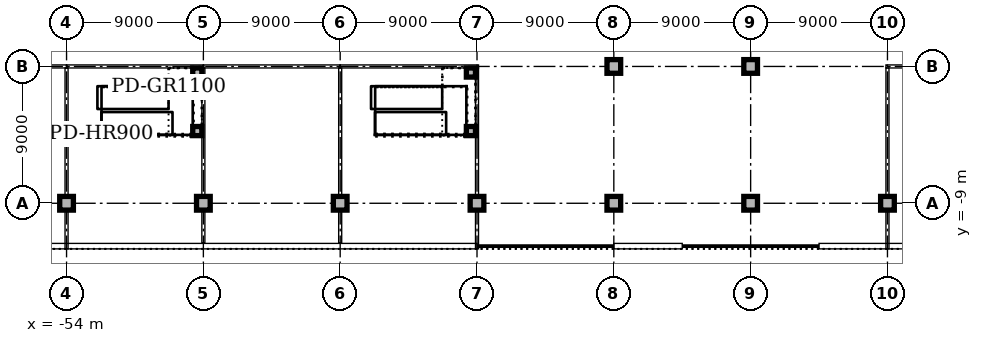
"""IFC4 building model, lengths in metres.
Left out: names, types, materials, properties, quantities, classifications, styles, units other than length and angle.
Written with IfcOpenShell. Run it as: python <this file> out.ifc"""

import sys

from ifc_helpers import new_model, si_unit, direction, frame, frame_2d, origin, origin_2d, place, context, subcontext, project, spatial, rectangle, extrude, element, fill, save


model = new_model("IFC4")
c1 = context("Model", 3, precision=1e-05, world=origin(), true_north=direction((0.0, 1.0)))
c2 = subcontext(c1, "Body", "Model", "MODEL_VIEW")
j1 = project(units=[si_unit("LENGTHUNIT", "METRE"), si_unit("PLANEANGLEUNIT", "RADIAN")], contexts=[c1])
p1 = place(None, origin())
s1 = spatial("IfcSite", under=j1, at=p1, CompositionType="ELEMENT")
p2 = place(p1, origin())
s2 = spatial("IfcBuilding", under=s1, at=p2, CompositionType="ELEMENT")
p3 = place(p2, origin())
s3 = spatial("IfcBuildingStorey", under=s2, at=p3, CompositionType="ELEMENT", Elevation=0.0)
for number, where, z_axis, x_axis in (
    (1, (-54.0, -9.0, 0.0), (0.0, 0.0, 1.0), (1.0, 0.0, 0.0)),
    (2, (-45.0, -9.0, 0.0), (0.0, 0.0, 1.0), (1.0, 0.0, 0.0)),
    (3, (-36.0, -9.0, 0.0), (0.0, 0.0, 1.0), (1.0, 0.0, 0.0)),
    (4, (-27.0, -9.0, 0.0), (0.0, 0.0, 1.0), (1.0, 0.0, 0.0)),
    (5, (-18.0, -9.0, 0.0), (0.0, 0.0, 1.0), (1.0, 0.0, 0.0)),
    (6, (-18.0, 0.0, 0.0), (0.0, 0.0, 1.0), (1.0, 0.0, 0.0)),
    (7, (-9.0, -9.0, 0.0), (0.0, 0.0, 1.0), (1.0, 0.0, 0.0)),
    (8, (-9.0, 0.0, 0.0), (0.0, 0.0, 1.0), (1.0, 0.0, 0.0)),
    (9, (0.0, -9.0, 0.0), (0.0, 0.0, 1.0), (1.0, 0.0, 0.0)),
):
    element("IfcColumn", number, at=place(p3, frame(where, z_axis=z_axis, x_axis=x_axis)), inside=s3, PredefinedType="COLUMN", context=c2, shape_type="SweptSolid", body=[
        extrude(rectangle(XDim=0.9, YDim=0.9, at=origin_2d()), origin(), (0.0, 0.0, 1.0), 5.7),
    ])
p4 = place(p3, frame((-81.0, -11.82, 0.0), z_axis=(0.0, 0.0, 1.0), x_axis=(1.0, 0.0, 0.0)))
e10 = element("IfcWall", 10, at=p4, inside=s3, PredefinedType="STANDARD", context=c2, shape_type="SweptSolid", body=[
    extrude(rectangle(XDim=54.0, YDim=0.36, at=frame_2d((27.0, 0.0))), origin(), (0.0, 0.0, 1.0), 5.7),
])
p5 = place(p4, frame((22.8, 0.0, 0.0)))
e11 = element("IfcOpeningElement", 11, at=p5, cuts=e10, PredefinedType="OPENING", context=c2, shape_type="SweptSolid", body=[
    extrude(rectangle(XDim=2.4, YDim=2.4, at=frame_2d((1.2, 1.2))), frame((0.0, 0.19, 0.0), z_axis=(0.0, -1.0, 0.0), x_axis=(1.0, 0.0, 0.0)), (0.0, 0.0, 1.0), 0.38),
])
p6 = place(p4, frame((13.8, 0.0, 0.0)))
e12 = element("IfcOpeningElement", 12, at=p6, cuts=e10, PredefinedType="OPENING", context=c2, shape_type="SweptSolid", body=[
    extrude(rectangle(XDim=2.4, YDim=2.2, at=frame_2d((1.2, 1.1))), frame((0.0, 0.19, 0.0), z_axis=(0.0, -1.0, 0.0), x_axis=(1.0, 0.0, 0.0)), (0.0, 0.0, 1.0), 0.38),
])
p7 = place(p4, frame((39.3, 0.0, 0.0)))
e13 = element("IfcOpeningElement", 13, at=p7, cuts=e10, PredefinedType="OPENING", context=c2, shape_type="SweptSolid", body=[
    extrude(rectangle(XDim=2.4, YDim=2.2, at=frame_2d((1.2, 1.1))), frame((0.0, 0.19, 0.0), z_axis=(0.0, -1.0, 0.0), x_axis=(1.0, 0.0, 0.0)), (0.0, 0.0, 1.0), 0.38),
])
p8 = place(p4, frame((2.1, 0.0, 0.0)))
e14 = element("IfcOpeningElement", 14, at=p8, cuts=e10, PredefinedType="OPENING", context=c2, shape_type="SweptSolid", body=[
    extrude(rectangle(XDim=1.8, YDim=2.2, at=frame_2d((0.9, 1.1))), frame((0.0, 0.19, 0.0), z_axis=(0.0, -1.0, 0.0), x_axis=(1.0, 0.0, 0.0)), (0.0, 0.0, 1.0), 0.38),
])
p9 = place(p4, frame((30.6, 0.0, 0.0)))
e15 = element("IfcOpeningElement", 15, at=p9, cuts=e10, PredefinedType="OPENING", context=c2, shape_type="SweptSolid", body=[
    extrude(rectangle(XDim=1.8, YDim=2.2, at=frame_2d((0.9, 1.1))), frame((0.0, 0.19, 0.0), z_axis=(0.0, -1.0, 0.0), x_axis=(1.0, 0.0, 0.0)), (0.0, 0.0, 1.0), 0.38),
])
p10 = place(p4, frame((48.6, 0.0, 0.0)))
e16 = element("IfcOpeningElement", 16, at=p10, cuts=e10, PredefinedType="OPENING", context=c2, shape_type="SweptSolid", body=[
    extrude(rectangle(XDim=1.8, YDim=2.2, at=frame_2d((0.9, 1.1))), frame((0.0, 0.19, 0.0), z_axis=(0.0, -1.0, 0.0), x_axis=(1.0, 0.0, 0.0)), (0.0, 0.0, 1.0), 0.38),
])
p11 = place(p4, frame((7.35, 0.0, 0.6)))
e17 = element("IfcOpeningElement", 17, at=p11, cuts=e10, PredefinedType="OPENING", context=c2, shape_type="SweptSolid", body=[
    extrude(rectangle(XDim=3.3, YDim=3.0, at=frame_2d((1.65, 1.5))), frame((0.0, 0.19, 0.0), z_axis=(0.0, -1.0, 0.0), x_axis=(1.0, 0.0, 0.0)), (0.0, 0.0, 1.0), 0.38),
])
p12 = place(p4, frame((34.35, 0.0, 0.6)))
e18 = element("IfcOpeningElement", 18, at=p12, cuts=e10, PredefinedType="OPENING", context=c2, shape_type="SweptSolid", body=[
    extrude(rectangle(XDim=3.3, YDim=3.0, at=frame_2d((1.65, 1.5))), frame((0.0, 0.19, 0.0), z_axis=(0.0, -1.0, 0.0), x_axis=(1.0, 0.0, 0.0)), (0.0, 0.0, 1.0), 0.38),
])
p13 = place(p4, frame((43.35, 0.0, 0.6)))
e19 = element("IfcOpeningElement", 19, at=p13, cuts=e10, PredefinedType="OPENING", context=c2, shape_type="SweptSolid", body=[
    extrude(rectangle(XDim=3.3, YDim=3.0, at=frame_2d((1.65, 1.5))), frame((0.0, 0.19, 0.0), z_axis=(0.0, -1.0, 0.0), x_axis=(1.0, 0.0, 0.0)), (0.0, 0.0, 1.0), 0.38),
])
p14 = place(p3, frame((-18.0, -11.82, 0.0), z_axis=(0.0, 0.0, 1.0), x_axis=(1.0, 0.0, 0.0)))
e20 = element("IfcWall", 20, at=p14, inside=s3, PredefinedType="STANDARD", context=c2, shape_type="SweptSolid", body=[
    extrude(rectangle(XDim=4.5, YDim=0.36, at=frame_2d((2.25, 0.0))), origin(), (0.0, 0.0, 1.0), 5.7),
])
p15 = place(p3, frame((-4.5, -11.82, 0.0), z_axis=(0.0, 0.0, 1.0), x_axis=(1.0, 0.0, 0.0)))
e21 = element("IfcWall", 21, at=p15, inside=s3, PredefinedType="STANDARD", context=c2, shape_type="SweptSolid", body=[
    extrude(rectangle(XDim=67.5, YDim=0.36, at=frame_2d((33.75, 0.0))), origin(), (0.0, 0.0, 1.0), 5.7),
])
p16 = place(p15, frame((1.05, 0.0, 0.0)))
e22 = element("IfcOpeningElement", 22, at=p16, cuts=e21, PredefinedType="OPENING", context=c2, shape_type="SweptSolid", body=[
    extrude(rectangle(XDim=2.4, YDim=2.4, at=frame_2d((1.2, 1.2))), frame((0.0, 0.19, 0.0), z_axis=(0.0, -1.0, 0.0), x_axis=(1.0, 0.0, 0.0)), (0.0, 0.0, 1.0), 0.38),
])
p17 = place(p15, frame((48.3, 0.0, 0.0)))
e23 = element("IfcOpeningElement", 23, at=p17, cuts=e21, PredefinedType="OPENING", context=c2, shape_type="SweptSolid", body=[
    extrude(rectangle(XDim=2.4, YDim=2.4, at=frame_2d((1.2, 1.2))), frame((0.0, 0.19, 0.0), z_axis=(0.0, -1.0, 0.0), x_axis=(1.0, 0.0, 0.0)), (0.0, 0.0, 1.0), 0.38),
])
p18 = place(p15, frame((34.8, 0.0, 0.0)))
e24 = element("IfcOpeningElement", 24, at=p18, cuts=e21, PredefinedType="OPENING", context=c2, shape_type="SweptSolid", body=[
    extrude(rectangle(XDim=2.4, YDim=2.4, at=frame_2d((1.2, 1.2))), frame((0.0, 0.19, 0.0), z_axis=(0.0, -1.0, 0.0), x_axis=(1.0, 0.0, 0.0)), (0.0, 0.0, 1.0), 0.38),
])
p19 = place(p15, frame((7.8, 0.0, 0.0)))
e25 = element("IfcOpeningElement", 25, at=p19, cuts=e21, PredefinedType="OPENING", context=c2, shape_type="SweptSolid", body=[
    extrude(rectangle(XDim=2.4, YDim=2.4, at=frame_2d((1.2, 1.2))), frame((0.0, 0.19, 0.0), z_axis=(0.0, -1.0, 0.0), x_axis=(1.0, 0.0, 0.0)), (0.0, 0.0, 1.0), 0.38),
])
p20 = place(p15, frame((17.1, 0.0, 0.0)))
e26 = element("IfcOpeningElement", 26, at=p20, cuts=e21, PredefinedType="OPENING", context=c2, shape_type="SweptSolid", body=[
    extrude(rectangle(XDim=1.8, YDim=2.2, at=frame_2d((0.9, 1.1))), frame((0.0, 0.19, 0.0), z_axis=(0.0, -1.0, 0.0), x_axis=(1.0, 0.0, 0.0)), (0.0, 0.0, 1.0), 0.38),
])
p21 = place(p15, frame((63.6, 0.0, 0.0)))
e27 = element("IfcOpeningElement", 27, at=p21, cuts=e21, PredefinedType="OPENING", context=c2, shape_type="SweptSolid", body=[
    extrude(rectangle(XDim=1.8, YDim=2.2, at=frame_2d((0.9, 1.1))), frame((0.0, 0.19, 0.0), z_axis=(0.0, -1.0, 0.0), x_axis=(1.0, 0.0, 0.0)), (0.0, 0.0, 1.0), 0.38),
])
p22 = place(p15, frame((11.85, 0.0, 0.6)))
e28 = element("IfcOpeningElement", 28, at=p22, cuts=e21, PredefinedType="OPENING", context=c2, shape_type="SweptSolid", body=[
    extrude(rectangle(XDim=3.3, YDim=3.0, at=frame_2d((1.65, 1.5))), frame((0.0, 0.19, 0.0), z_axis=(0.0, -1.0, 0.0), x_axis=(1.0, 0.0, 0.0)), (0.0, 0.0, 1.0), 0.38),
])
p23 = place(p15, frame((20.85, 0.0, 0.6)))
e29 = element("IfcOpeningElement", 29, at=p23, cuts=e21, PredefinedType="OPENING", context=c2, shape_type="SweptSolid", body=[
    extrude(rectangle(XDim=3.3, YDim=3.0, at=frame_2d((1.65, 1.5))), frame((0.0, 0.19, 0.0), z_axis=(0.0, -1.0, 0.0), x_axis=(1.0, 0.0, 0.0)), (0.0, 0.0, 1.0), 0.38),
])
p24 = place(p15, frame((25.35, 0.0, 0.6)))
e30 = element("IfcOpeningElement", 30, at=p24, cuts=e21, PredefinedType="OPENING", context=c2, shape_type="SweptSolid", body=[
    extrude(rectangle(XDim=3.3, YDim=3.0, at=frame_2d((1.65, 1.5))), frame((0.0, 0.19, 0.0), z_axis=(0.0, -1.0, 0.0), x_axis=(1.0, 0.0, 0.0)), (0.0, 0.0, 1.0), 0.38),
])
p25 = place(p15, frame((29.85, 0.0, 0.6)))
e31 = element("IfcOpeningElement", 31, at=p25, cuts=e21, PredefinedType="OPENING", context=c2, shape_type="SweptSolid", body=[
    extrude(rectangle(XDim=3.3, YDim=3.0, at=frame_2d((1.65, 1.5))), frame((0.0, 0.19, 0.0), z_axis=(0.0, -1.0, 0.0), x_axis=(1.0, 0.0, 0.0)), (0.0, 0.0, 1.0), 0.38),
])
p26 = place(p15, frame((38.85, 0.0, 0.6)))
e32 = element("IfcOpeningElement", 32, at=p26, cuts=e21, PredefinedType="OPENING", context=c2, shape_type="SweptSolid", body=[
    extrude(rectangle(XDim=3.3, YDim=3.0, at=frame_2d((1.65, 1.5))), frame((0.0, 0.19, 0.0), z_axis=(0.0, -1.0, 0.0), x_axis=(1.0, 0.0, 0.0)), (0.0, 0.0, 1.0), 0.38),
])
p27 = place(p15, frame((43.35, 0.0, 0.6)))
e33 = element("IfcOpeningElement", 33, at=p27, cuts=e21, PredefinedType="OPENING", context=c2, shape_type="SweptSolid", body=[
    extrude(rectangle(XDim=3.3, YDim=3.0, at=frame_2d((1.65, 1.5))), frame((0.0, 0.19, 0.0), z_axis=(0.0, -1.0, 0.0), x_axis=(1.0, 0.0, 0.0)), (0.0, 0.0, 1.0), 0.38),
])
p28 = place(p15, frame((52.35, 0.0, 0.6)))
e34 = element("IfcOpeningElement", 34, at=p28, cuts=e21, PredefinedType="OPENING", context=c2, shape_type="SweptSolid", body=[
    extrude(rectangle(XDim=3.3, YDim=3.0, at=frame_2d((1.65, 1.5))), frame((0.0, 0.19, 0.0), z_axis=(0.0, -1.0, 0.0), x_axis=(1.0, 0.0, 0.0)), (0.0, 0.0, 1.0), 0.38),
])
p29 = place(p15, frame((56.85, 0.0, 0.6)))
e35 = element("IfcOpeningElement", 35, at=p29, cuts=e21, PredefinedType="OPENING", context=c2, shape_type="SweptSolid", body=[
    extrude(rectangle(XDim=3.3, YDim=3.0, at=frame_2d((1.65, 1.5))), frame((0.0, 0.19, 0.0), z_axis=(0.0, -1.0, 0.0), x_axis=(1.0, 0.0, 0.0)), (0.0, 0.0, 1.0), 0.38),
])
for number, where, z_axis, x_axis in (
    (36, (-45.4, -4.25, 0.0), (0.0, 0.0, 1.0), (1.0, 0.0, 0.0)),
    (37, (-45.4, -0.4, 0.0), (0.0, 0.0, 1.0), (1.0, 0.0, 0.0)),
    (38, (-27.4, -4.25, 0.0), (0.0, 0.0, 1.0), (1.0, 0.0, 0.0)),
    (39, (-27.4, -0.4, 0.0), (0.0, 0.0, 1.0), (1.0, 0.0, 0.0)),
):
    element("IfcColumn", number, at=place(p3, frame(where, z_axis=z_axis, x_axis=x_axis)), inside=s3, PredefinedType="COLUMN", context=c2, shape_type="SweptSolid", body=[
        extrude(rectangle(XDim=0.6, YDim=0.6, at=origin_2d()), origin(), (0.0, 0.0, 1.0), 6.0),
    ])
p30 = place(p3, frame((-54.0, 0.0, 0.0), z_axis=(0.0, 0.0, 1.0), x_axis=(1.0, 0.0, 0.0)))
e40 = element("IfcWall", 40, at=p30, inside=s3, PredefinedType="SOLIDWALL", context=c2, shape_type="SweptSolid", body=[
    extrude(rectangle(XDim=9.0, YDim=0.2, at=frame_2d((4.5, 0.0))), origin(), (0.0, 0.0, 1.0), 5.7),
])
p31 = place(p3, frame((-54.0, -12.0, 0.0), z_axis=(0.0, 0.0, 1.0), x_axis=(0.0, 1.0, 0.0)))
e41 = element("IfcWall", 41, at=p31, inside=s3, PredefinedType="SOLIDWALL", context=c2, shape_type="SweptSolid", body=[
    extrude(rectangle(XDim=2.53, YDim=0.2, at=frame_2d((1.265, 0.0))), origin(), (0.0, 0.0, 1.0), 5.7),
])
p32 = place(p3, frame((-54.0, -8.53, 0.0), z_axis=(0.0, 0.0, 1.0), x_axis=(0.0, 1.0, 0.0)))
e42 = element("IfcWall", 42, at=p32, inside=s3, PredefinedType="SOLIDWALL", context=c2, shape_type="SweptSolid", body=[
    extrude(rectangle(XDim=8.43, YDim=0.2, at=frame_2d((4.215, 0.0))), origin(), (0.0, 0.0, 1.0), 5.7),
])
p33 = place(p3, frame((-45.0, -11.6, 0.0), z_axis=(0.0, 0.0, 1.0), x_axis=(0.0, 1.0, 0.0)))
e43 = element("IfcWall", 43, at=p33, inside=s3, PredefinedType="SOLIDWALL", context=c2, shape_type="SweptSolid", body=[
    extrude(rectangle(XDim=2.13, YDim=0.2, at=frame_2d((1.065, 0.0))), origin(), (0.0, 0.0, 1.0), 5.7),
])
p34 = place(p3, frame((-45.0, -8.53, 0.0), z_axis=(0.0, 0.0, 1.0), x_axis=(0.0, 1.0, 0.0)))
e44 = element("IfcWall", 44, at=p34, inside=s3, PredefinedType="SOLIDWALL", context=c2, shape_type="SweptSolid", body=[
    extrude(rectangle(XDim=8.43, YDim=0.2, at=frame_2d((4.215, 0.0))), origin(), (0.0, 0.0, 1.0), 5.7),
])
p35 = place(p3, frame((-27.0, -12.0, 0.0), z_axis=(0.0, 0.0, 1.0), x_axis=(0.0, 1.0, 0.0)))
e45 = element("IfcWall", 45, at=p35, inside=s3, PredefinedType="SOLIDWALL", context=c2, shape_type="SweptSolid", body=[
    extrude(rectangle(XDim=2.53, YDim=0.2, at=frame_2d((1.265, 0.0))), origin(), (0.0, 0.0, 1.0), 5.7),
])
p36 = place(p3, frame((-27.0, -8.53, 0.0), z_axis=(0.0, 0.0, 1.0), x_axis=(0.0, 1.0, 0.0)))
e46 = element("IfcWall", 46, at=p36, inside=s3, PredefinedType="SOLIDWALL", context=c2, shape_type="SweptSolid", body=[
    extrude(rectangle(XDim=8.43, YDim=0.2, at=frame_2d((4.215, 0.0))), origin(), (0.0, 0.0, 1.0), 5.7),
])
p37 = place(p3, frame((-36.0, 0.0, 0.0), z_axis=(0.0, 0.0, 1.0), x_axis=(1.0, 0.0, 0.0)))
e47 = element("IfcWall", 47, at=p37, inside=s3, PredefinedType="SOLIDWALL", context=c2, shape_type="SweptSolid", body=[
    extrude(rectangle(XDim=9.1, YDim=0.2, at=frame_2d((4.55, 0.0))), origin(), (0.0, 0.0, 1.0), 5.7),
])
p38 = place(p3, frame((-36.0, -11.6, 0.0), z_axis=(0.0, 0.0, 1.0), x_axis=(0.0, 1.0, 0.0)))
e48 = element("IfcWall", 48, at=p38, inside=s3, PredefinedType="SOLIDWALL", context=c2, shape_type="SweptSolid", body=[
    extrude(rectangle(XDim=2.13, YDim=0.2, at=frame_2d((1.065, 0.0))), origin(), (0.0, 0.0, 1.0), 5.7),
])
p39 = place(p3, frame((-36.0, -8.53, 0.0), z_axis=(0.0, 0.0, 1.0), x_axis=(0.0, 1.0, 0.0)))
e49 = element("IfcWall", 49, at=p39, inside=s3, PredefinedType="SOLIDWALL", context=c2, shape_type="SweptSolid", body=[
    extrude(rectangle(XDim=8.43, YDim=0.2, at=frame_2d((4.215, 0.0))), origin(), (0.0, 0.0, 1.0), 5.7),
])
p40 = place(p3, frame((0.0, -12.0, 0.0), z_axis=(0.0, 0.0, 1.0), x_axis=(0.0, 1.0, 0.0)))
e50 = element("IfcWall", 50, at=p40, inside=s3, PredefinedType="PARTITIONING", context=c2, shape_type="SweptSolid", body=[
    extrude(rectangle(XDim=2.53, YDim=0.2, at=frame_2d((1.265, 0.0))), origin(), (0.0, 0.0, 1.0), 5.7),
])
p41 = place(p3, frame((0.0, -8.53, 0.0), z_axis=(0.0, 0.0, 1.0), x_axis=(0.0, 1.0, 0.0)))
e51 = element("IfcWall", 51, at=p41, inside=s3, PredefinedType="PARTITIONING", context=c2, shape_type="SweptSolid", body=[
    extrude(rectangle(XDim=8.43, YDim=0.2, at=frame_2d((4.215, 0.0))), origin(), (0.0, 0.0, 1.0), 5.7),
])
p42 = place(p41, frame((2.03, 0.0, 0.0)))
e52 = element("IfcOpeningElement", 52, at=p42, cuts=e51, PredefinedType="OPENING", context=c2, shape_type="SweptSolid", body=[
    extrude(rectangle(XDim=1.0, YDim=2.1, at=frame_2d((0.5, 1.05))), frame((0.0, 0.11, 0.0), z_axis=(0.0, -1.0, 0.0), x_axis=(1.0, 0.0, 0.0)), (0.0, 0.0, 1.0), 0.22),
])
p43 = place(p3, frame((-63.0, 0.0, 0.0), z_axis=(0.0, 0.0, 1.0), x_axis=(1.0, 0.0, 0.0)))
e53 = element("IfcWall", 53, at=p43, inside=s3, PredefinedType="PARTITIONING", context=c2, shape_type="SweptSolid", body=[
    extrude(rectangle(XDim=9.0, YDim=0.2, at=frame_2d((4.5, 0.0))), origin(), (0.0, 0.0, 1.0), 5.7),
])
p44 = place(p43, frame((7.7, 0.0, 0.0)))
e54 = element("IfcOpeningElement", 54, at=p44, cuts=e53, PredefinedType="OPENING", context=c2, shape_type="SweptSolid", body=[
    extrude(rectangle(XDim=1.0, YDim=2.1, at=frame_2d((0.5, 1.05))), frame((0.0, 0.11, 0.0), z_axis=(0.0, -1.0, 0.0), x_axis=(1.0, 0.0, 0.0)), (0.0, 0.0, 1.0), 0.22),
])
p45 = place(p3, frame((-45.0, 0.0, 0.0), z_axis=(0.0, 0.0, 1.0), x_axis=(1.0, 0.0, 0.0)))
e55 = element("IfcWall", 55, at=p45, inside=s3, PredefinedType="PARTITIONING", context=c2, shape_type="SweptSolid", body=[
    extrude(rectangle(XDim=9.0, YDim=0.2, at=frame_2d((4.5, 0.0))), origin(), (0.0, 0.0, 1.0), 5.7),
])
p46 = place(p45, frame((4.0, 0.0, 0.0)))
e56 = element("IfcOpeningElement", 56, at=p46, cuts=e55, PredefinedType="OPENING", context=c2, shape_type="SweptSolid", body=[
    extrude(rectangle(XDim=1.0, YDim=2.1, at=frame_2d((0.5, 1.05))), frame((0.0, 0.11, 0.0), z_axis=(0.0, -1.0, 0.0), x_axis=(1.0, 0.0, 0.0)), (0.0, 0.0, 1.0), 0.22),
])
p47 = place(p3, frame((-0.1, 0.0, 0.0), z_axis=(0.0, 0.0, 1.0), x_axis=(1.0, 0.0, 0.0)))
e57 = element("IfcWall", 57, at=p47, inside=s3, PredefinedType="PARTITIONING", context=c2, shape_type="SweptSolid", body=[
    extrude(rectangle(XDim=9.1, YDim=0.2, at=frame_2d((4.55, 0.0))), origin(), (0.0, 0.0, 1.0), 5.7),
])
p48 = place(p7, frame((2.4, 0.0, 0.0), z_axis=(0.0, 0.0, 1.0), x_axis=(-1.0, 0.0, 0.0)))
e58 = element("IfcDoor", 58, at=p48, inside=s3, OperationType="DOUBLE_DOOR_SINGLE_SWING", PredefinedType="DOOR", context=c2, shape_type="SweptSolid", body=[
    extrude(rectangle(XDim=2.4, YDim=2.2, at=frame_2d((1.2, 1.1))), frame((0.0, -0.07, 0.0), z_axis=(0.0, -1.0, 0.0), x_axis=(1.0, 0.0, 0.0)), (0.0, 0.0, 1.0), 0.05),
])
fill(e13, e58)
p49 = place(p9, frame((1.8, 0.0, 0.0), z_axis=(0.0, 0.0, 1.0), x_axis=(-1.0, 0.0, 0.0)))
e59 = element("IfcDoor", 59, at=p49, inside=s3, OperationType="DOUBLE_DOOR_SINGLE_SWING", PredefinedType="DOOR", context=c2, shape_type="SweptSolid", body=[
    extrude(rectangle(XDim=1.8, YDim=2.2, at=frame_2d((0.9, 1.1))), frame((0.0, -0.07, 0.0), z_axis=(0.0, -1.0, 0.0), x_axis=(1.0, 0.0, 0.0)), (0.0, 0.0, 1.0), 0.05),
])
fill(e15, e59)
p50 = place(p10, frame((1.8, 0.0, 0.0), z_axis=(0.0, 0.0, 1.0), x_axis=(-1.0, 0.0, 0.0)))
e60 = element("IfcDoor", 60, at=p50, inside=s3, OperationType="DOUBLE_DOOR_SINGLE_SWING", PredefinedType="DOOR", context=c2, shape_type="SweptSolid", body=[
    extrude(rectangle(XDim=1.8, YDim=2.2, at=frame_2d((0.9, 1.1))), frame((0.0, -0.07, 0.0), z_axis=(0.0, -1.0, 0.0), x_axis=(1.0, 0.0, 0.0)), (0.0, 0.0, 1.0), 0.05),
])
fill(e16, e60)
p51 = place(p12, origin())
e61 = element("IfcWindow", 61, at=p51, inside=s3, PartitioningType="SINGLE_PANEL", PredefinedType="WINDOW", context=c2, shape_type="SweptSolid", body=[
    extrude(rectangle(XDim=3.3, YDim=3.0, at=frame_2d((1.65, 1.5))), frame((0.0, 0.13, 0.0), z_axis=(0.0, -1.0, 0.0), x_axis=(1.0, 0.0, 0.0)), (0.0, 0.0, 1.0), 0.06),
])
fill(e18, e61)
p52 = place(p13, origin())
e62 = element("IfcWindow", 62, at=p52, inside=s3, PartitioningType="SINGLE_PANEL", PredefinedType="WINDOW", context=c2, shape_type="SweptSolid", body=[
    extrude(rectangle(XDim=3.3, YDim=3.0, at=frame_2d((1.65, 1.5))), frame((0.0, 0.13, 0.0), z_axis=(0.0, -1.0, 0.0), x_axis=(1.0, 0.0, 0.0)), (0.0, 0.0, 1.0), 0.06),
])
fill(e19, e62)
p53 = place(p16, frame((2.4, 0.0, 0.0), z_axis=(0.0, 0.0, 1.0), x_axis=(-1.0, 0.0, 0.0)))
e63 = element("IfcDoor", 63, at=p53, inside=s3, OperationType="DOUBLE_DOOR_SINGLE_SWING", PredefinedType="DOOR", context=c2, shape_type="SweptSolid", body=[
    extrude(rectangle(XDim=2.4, YDim=2.4, at=frame_2d((1.2, 1.2))), frame((0.0, -0.07, 0.0), z_axis=(0.0, -1.0, 0.0), x_axis=(1.0, 0.0, 0.0)), (0.0, 0.0, 1.0), 0.05),
])
fill(e22, e63)
p54 = place(p44, frame((1.0, 0.0, 0.0), z_axis=(0.0, 0.0, 1.0), x_axis=(-1.0, 0.0, 0.0)))
e64 = element("IfcDoor", 64, at=p54, inside=s3, OperationType="SINGLE_SWING_LEFT", PredefinedType="DOOR", context=c2, shape_type="SweptSolid", body=[
    extrude(rectangle(XDim=1.0, YDim=2.1, at=frame_2d((0.5, 1.05))), frame((0.0, 0.025, 0.0), z_axis=(0.0, -1.0, 0.0), x_axis=(1.0, 0.0, 0.0)), (0.0, 0.0, 1.0), 0.05),
])
fill(e54, e64)
p55 = place(p46, frame((1.0, 0.0, 0.0), z_axis=(0.0, 0.0, 1.0), x_axis=(-1.0, 0.0, 0.0)))
e65 = element("IfcDoor", 65, at=p55, inside=s3, OperationType="SINGLE_SWING_LEFT", PredefinedType="DOOR", context=c2, shape_type="SweptSolid", body=[
    extrude(rectangle(XDim=1.0, YDim=2.1, at=frame_2d((0.5, 1.05))), frame((0.0, 0.025, 0.0), z_axis=(0.0, -1.0, 0.0), x_axis=(1.0, 0.0, 0.0)), (0.0, 0.0, 1.0), 0.05),
])
fill(e56, e65)
p56 = place(p42, frame((1.0, 0.0, 0.0), z_axis=(0.0, 0.0, 1.0), x_axis=(-1.0, 0.0, 0.0)))
e66 = element("IfcDoor", 66, at=p56, inside=s3, OperationType="SINGLE_SWING_LEFT", PredefinedType="DOOR", context=c2, shape_type="SweptSolid", body=[
    extrude(rectangle(XDim=1.0, YDim=2.1, at=frame_2d((0.5, 1.05))), frame((0.0, 0.025, 0.0), z_axis=(0.0, -1.0, 0.0), x_axis=(1.0, 0.0, 0.0)), (0.0, 0.0, 1.0), 0.05),
])
fill(e52, e66)
save(model, sys.argv[1])
